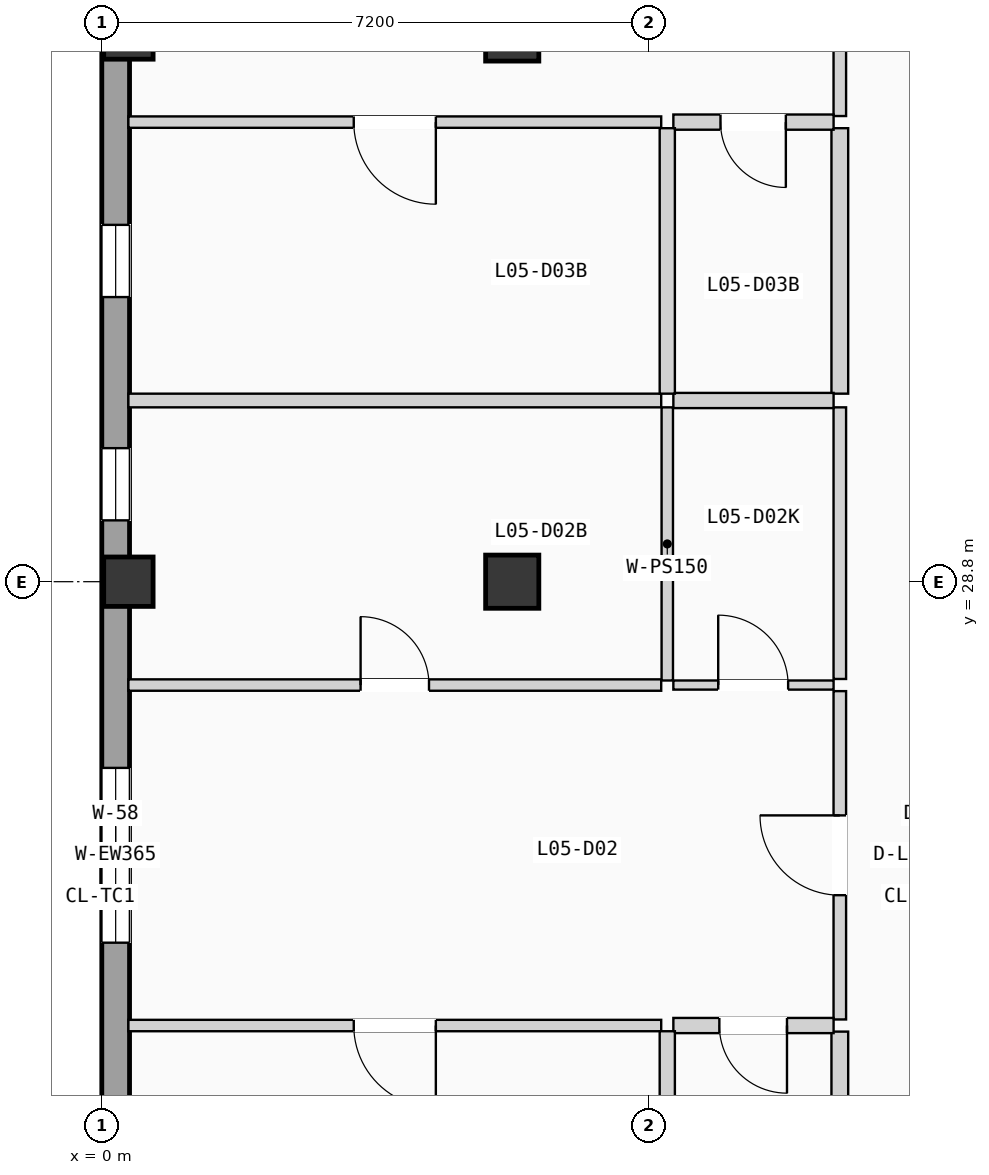
"""IFC4 building model, lengths in metres.
Left out: names, types, materials, properties, quantities, classifications, styles, units other than length and angle.
Written with IfcOpenShell. Run it as: python <this file> out.ifc"""

import sys

from ifc_helpers import new_model, si_unit, direction, frame, frame_2d, origin, origin_2d, place, context, subcontext, project, spatial, rectangle, extrude, element, fill, save


model = new_model("IFC4")
c1 = context("Model", 3, precision=1e-05, world=origin(), true_north=direction((0.0, 1.0)))
c2 = subcontext(c1, "Body", "Model", "MODEL_VIEW")
j1 = project(units=[si_unit("LENGTHUNIT", "METRE"), si_unit("PLANEANGLEUNIT", "RADIAN")], contexts=[c1])
p1 = place(None, origin())
s1 = spatial("IfcSite", under=j1, at=p1, CompositionType="ELEMENT")
p2 = place(p1, origin())
s2 = spatial("IfcBuilding", under=s1, at=p2, CompositionType="ELEMENT")
p3 = place(p2, frame((0.0, 0.0, 18.375)))
s3 = spatial("IfcBuildingStorey", under=s2, at=p3, CompositionType="ELEMENT", Elevation=18.375)
for number, where, z_axis, x_axis in (
    (1, (0.35, 28.8, 0.0), (0.0, 0.0, 1.0), (1.0, 0.0, 0.0)),
    (2, (0.35, 36.0, 0.0), (0.0, 0.0, 1.0), (1.0, 0.0, 0.0)),
):
    element("IfcColumn", number, at=place(p3, frame(where, z_axis=z_axis, x_axis=x_axis)), inside=s3, PredefinedType="COLUMN", context=c2, shape_type="SweptSolid", body=[
        extrude(rectangle(XDim=0.65, YDim=0.65, at=origin_2d()), origin(), (0.0, 0.0, 1.0), 3.15),
    ])
for number, where, z_axis, x_axis in (
    (3, (5.4, 28.8, 0.0), (0.0, 0.0, 1.0), (1.0, 0.0, 0.0)),
    (4, (5.4, 36.0, 0.0), (0.0, 0.0, 1.0), (1.0, 0.0, 0.0)),
):
    element("IfcColumn", number, at=place(p3, frame(where, z_axis=z_axis, x_axis=x_axis)), inside=s3, PredefinedType="COLUMN", context=c2, shape_type="SweptSolid", body=[
        extrude(rectangle(XDim=0.7, YDim=0.7, at=origin_2d()), origin(), (0.0, 0.0, 1.0), 3.15),
    ])
p4 = place(p3, frame((0.183, 0.365, 0.0), z_axis=(0.0, 0.0, 1.0), x_axis=(0.0, 1.0, 0.0)))
e5 = element("IfcWall", 5, at=p4, inside=s3, PredefinedType="SOLIDWALL", context=c2, shape_type="SweptSolid", body=[
    extrude(rectangle(XDim=49.67, YDim=0.365, at=frame_2d((24.835, 0.0))), origin(), (0.0, 0.0, 1.0), 2.89),
])
p5 = place(p4, frame((11.851, 0.0, 0.85)))
e6 = element("IfcOpeningElement", 6, at=p5, cuts=e5, PredefinedType="OPENING", context=c2, shape_type="SweptSolid", body=[
    extrude(rectangle(XDim=0.95, YDim=1.2, at=frame_2d((0.475, 0.6))), frame((0.0, 0.192, 0.0), z_axis=(0.0, -1.0, 0.0), x_axis=(1.0, 0.0, 0.0)), (0.0, 0.0, 1.0), 0.385),
])
p6 = place(p4, frame((7.831, 0.0, 0.9)))
e7 = element("IfcOpeningElement", 7, at=p6, cuts=e5, PredefinedType="OPENING", context=c2, shape_type="SweptSolid", body=[
    extrude(rectangle(XDim=2.3, YDim=1.2, at=frame_2d((1.15, 0.6))), frame((0.0, 0.192, 0.0), z_axis=(0.0, -1.0, 0.0), x_axis=(1.0, 0.0, 0.0)), (0.0, 0.0, 1.0), 0.385),
])
p7 = place(p4, frame((15.865, 0.0, 0.855)))
e8 = element("IfcOpeningElement", 8, at=p7, cuts=e5, PredefinedType="OPENING", context=c2, shape_type="SweptSolid", body=[
    extrude(rectangle(XDim=2.3, YDim=1.35, at=frame_2d((1.15, 0.675))), frame((0.0, 0.192, 0.0), z_axis=(0.0, -1.0, 0.0), x_axis=(1.0, 0.0, 0.0)), (0.0, 0.0, 1.0), 0.385),
])
p8 = place(p4, frame((23.685, 0.0, 0.705)))
e9 = element("IfcOpeningElement", 9, at=p8, cuts=e5, PredefinedType="OPENING", context=c2, shape_type="SweptSolid", body=[
    extrude(rectangle(XDim=2.3, YDim=1.5, at=frame_2d((1.15, 0.75))), frame((0.0, 0.192, 0.0), z_axis=(0.0, -1.0, 0.0), x_axis=(1.0, 0.0, 0.0)), (0.0, 0.0, 1.0), 0.385),
])
p9 = place(p4, frame((19.478, 0.0, 0.85)))
e10 = element("IfcOpeningElement", 10, at=p9, cuts=e5, PredefinedType="OPENING", context=c2, shape_type="SweptSolid", body=[
    extrude(rectangle(XDim=0.95, YDim=1.2, at=frame_2d((0.475, 0.6))), frame((0.0, 0.192, 0.0), z_axis=(0.0, -1.0, 0.0), x_axis=(1.0, 0.0, 0.0)), (0.0, 0.0, 1.0), 0.385),
])
p10 = place(p4, frame((29.242, 0.0, 0.85)))
e11 = element("IfcOpeningElement", 11, at=p10, cuts=e5, PredefinedType="OPENING", context=c2, shape_type="SweptSolid", body=[
    extrude(rectangle(XDim=0.95, YDim=1.2, at=frame_2d((0.475, 0.6))), frame((0.0, 0.192, 0.0), z_axis=(0.0, -1.0, 0.0), x_axis=(1.0, 0.0, 0.0)), (0.0, 0.0, 1.0), 0.385),
])
p11 = place(p4, frame((36.868, 0.0, 0.9)))
e12 = element("IfcOpeningElement", 12, at=p11, cuts=e5, PredefinedType="OPENING", context=c2, shape_type="SweptSolid", body=[
    extrude(rectangle(XDim=0.95, YDim=1.2, at=frame_2d((0.475, 0.6))), frame((0.0, 0.192, 0.0), z_axis=(0.0, -1.0, 0.0), x_axis=(1.0, 0.0, 0.0)), (0.0, 0.0, 1.0), 0.385),
])
p12 = place(p4, frame((32.18, 0.0, 0.855)))
e13 = element("IfcOpeningElement", 13, at=p12, cuts=e5, PredefinedType="OPENING", context=c2, shape_type="SweptSolid", body=[
    extrude(rectangle(XDim=0.95, YDim=1.35, at=frame_2d((0.475, 0.675))), frame((0.0, 0.192, 0.0), z_axis=(0.0, -1.0, 0.0), x_axis=(1.0, 0.0, 0.0)), (0.0, 0.0, 1.0), 0.385),
])
p13 = place(p4, frame((40.213, 0.0, 0.705)))
e14 = element("IfcOpeningElement", 14, at=p13, cuts=e5, PredefinedType="OPENING", context=c2, shape_type="SweptSolid", body=[
    extrude(rectangle(XDim=0.95, YDim=1.5, at=frame_2d((0.475, 0.75))), frame((0.0, 0.192, 0.0), z_axis=(0.0, -1.0, 0.0), x_axis=(1.0, 0.0, 0.0)), (0.0, 0.0, 1.0), 0.385),
])
p14 = place(p3, frame((9.71, 23.04, 0.0), z_axis=(0.0, 0.0, 1.0), x_axis=(0.0, 1.0, 0.0)))
e15 = element("IfcWall", 15, at=p14, inside=s3, PredefinedType="PARTITIONING", context=c2, shape_type="SweptSolid", body=[
    extrude(rectangle(XDim=4.32, YDim=0.165, at=frame_2d((2.16, 0.0))), origin(), (0.0, 0.0, 1.0), 2.87),
])
p15 = place(p14, frame((1.635, 0.0, 0.0)))
e16 = element("IfcOpeningElement", 16, at=p15, cuts=e15, PredefinedType="OPENING", context=c2, shape_type="SweptSolid", body=[
    extrude(rectangle(XDim=1.05, YDim=2.13, at=frame_2d((0.525, 1.065))), frame((0.0, 0.093, 0.0), z_axis=(0.0, -1.0, 0.0), x_axis=(1.0, 0.0, 0.0)), (0.0, 0.0, 1.0), 0.185),
])
p16 = place(p3, frame((9.71, 19.306, 0.0), z_axis=(0.0, 0.0, 1.0), x_axis=(0.0, 1.0, 0.0)))
e17 = element("IfcWall", 17, at=p16, inside=s3, PredefinedType="PLUMBINGWALL", context=c2, shape_type="SweptSolid", body=[
    extrude(rectangle(XDim=3.574, YDim=0.22, at=frame_2d((1.787, 0.0))), origin(), (0.0, 0.0, 1.0), 2.87),
])
p17 = place(p3, frame((9.71, 27.52, 0.0), z_axis=(0.0, 0.0, 1.0), x_axis=(0.0, 1.0, 0.0)))
e18 = element("IfcWall", 18, at=p17, inside=s3, PredefinedType="PARTITIONING", context=c2, shape_type="SweptSolid", body=[
    extrude(rectangle(XDim=3.574, YDim=0.165, at=frame_2d((1.787, 0.0))), origin(), (0.0, 0.0, 1.0), 2.87),
])
p18 = place(p3, frame((9.71, 34.927, 0.0), z_axis=(0.0, 0.0, 1.0), x_axis=(0.0, 1.0, 0.0)))
e19 = element("IfcWall", 19, at=p18, inside=s3, PredefinedType="PARTITIONING", context=c2, shape_type="SweptSolid", body=[
    extrude(rectangle(XDim=4.22, YDim=0.165, at=frame_2d((2.11, 0.0))), origin(), (0.0, 0.0, 1.0), 2.87),
])
p19 = place(p18, frame((1.585, 0.0, 0.0)))
e20 = element("IfcOpeningElement", 20, at=p19, cuts=e19, PredefinedType="OPENING", context=c2, shape_type="SweptSolid", body=[
    extrude(rectangle(XDim=1.05, YDim=2.13, at=frame_2d((0.525, 1.065))), frame((0.0, 0.093, 0.0), z_axis=(0.0, -1.0, 0.0), x_axis=(1.0, 0.0, 0.0)), (0.0, 0.0, 1.0), 0.185),
])
p20 = place(p3, frame((9.71, 31.274, 0.0), z_axis=(0.0, 0.0, 1.0), x_axis=(0.0, 1.0, 0.0)))
e21 = element("IfcWall", 21, at=p20, inside=s3, PredefinedType="PLUMBINGWALL", context=c2, shape_type="SweptSolid", body=[
    extrude(rectangle(XDim=3.493, YDim=0.22, at=frame_2d((1.747, 0.0))), origin(), (0.0, 0.0, 1.0), 2.87),
])
p21 = place(p3, frame((7.52, 22.96, 0.0), z_axis=(0.0, 0.0, 1.0), x_axis=(1.0, 0.0, 0.0)))
e22 = element("IfcWall", 22, at=p21, inside=s3, PredefinedType="PLUMBINGWALL", context=c2, shape_type="SweptSolid", body=[
    extrude(rectangle(XDim=2.108, YDim=0.2, at=frame_2d((1.054, 0.0))), origin(), (0.0, 0.0, 1.0), 2.87),
])
p22 = place(p21, frame((0.605, 0.0, 0.0)))
e23 = element("IfcOpeningElement", 23, at=p22, cuts=e22, PredefinedType="OPENING", context=c2, shape_type="SweptSolid", body=[
    extrude(rectangle(XDim=0.89, YDim=2.03, at=frame_2d((0.445, 1.015))), frame((0.0, 0.11, 0.0), z_axis=(0.0, -1.0, 0.0), x_axis=(1.0, 0.0, 0.0)), (0.0, 0.0, 1.0), 0.22),
])
p23 = place(p3, frame((7.52, 27.44, 0.0), z_axis=(0.0, 0.0, 1.0), x_axis=(1.0, 0.0, 0.0)))
e24 = element("IfcWall", 24, at=p23, inside=s3, PredefinedType="PARTITIONING", context=c2, shape_type="SweptSolid", body=[
    extrude(rectangle(XDim=2.108, YDim=0.12, at=frame_2d((1.054, 0.0))), origin(), (0.0, 0.0, 1.0), 2.87),
])
p24 = place(p23, frame((0.59, 0.0, 0.0)))
e25 = element("IfcOpeningElement", 25, at=p24, cuts=e24, PredefinedType="OPENING", context=c2, shape_type="SweptSolid", body=[
    extrude(rectangle(XDim=0.92, YDim=2.02, at=frame_2d((0.46, 1.01))), frame((0.0, 0.07, 0.0), z_axis=(0.0, -1.0, 0.0), x_axis=(1.0, 0.0, 0.0)), (0.0, 0.0, 1.0), 0.14),
])
p25 = place(p3, frame((0.35, 22.96, 0.0), z_axis=(0.0, 0.0, 1.0), x_axis=(1.0, 0.0, 0.0)))
e26 = element("IfcWall", 26, at=p25, inside=s3, PredefinedType="PARTITIONING", context=c2, shape_type="SweptSolid", body=[
    extrude(rectangle(XDim=7.01, YDim=0.15, at=frame_2d((3.505, 0.0))), origin(), (0.0, 0.0, 1.0), 2.87),
])
p26 = place(p25, frame((2.965, 0.0, 0.0)))
e27 = element("IfcOpeningElement", 27, at=p26, cuts=e26, PredefinedType="OPENING", context=c2, shape_type="SweptSolid", body=[
    extrude(rectangle(XDim=1.08, YDim=2.1, at=frame_2d((0.54, 1.05))), frame((0.0, 0.085, 0.0), z_axis=(0.0, -1.0, 0.0), x_axis=(1.0, 0.0, 0.0)), (0.0, 0.0, 1.0), 0.17),
])
p27 = place(p3, frame((0.35, 27.44, 0.0), z_axis=(0.0, 0.0, 1.0), x_axis=(1.0, 0.0, 0.0)))
e28 = element("IfcWall", 28, at=p27, inside=s3, PredefinedType="PARTITIONING", context=c2, shape_type="SweptSolid", body=[
    extrude(rectangle(XDim=7.01, YDim=0.15, at=frame_2d((3.505, 0.0))), origin(), (0.0, 0.0, 1.0), 2.87),
])
p28 = place(p27, frame((3.055, 0.0, 0.0)))
e29 = element("IfcOpeningElement", 29, at=p28, cuts=e28, PredefinedType="OPENING", context=c2, shape_type="SweptSolid", body=[
    extrude(rectangle(XDim=0.9, YDim=2.04, at=frame_2d((0.45, 1.02))), frame((0.0, 0.085, 0.0), z_axis=(0.0, -1.0, 0.0), x_axis=(1.0, 0.0, 0.0)), (0.0, 0.0, 1.0), 0.17),
])
p29 = place(p3, frame((7.44, 19.306, 0.0), z_axis=(0.0, 0.0, 1.0), x_axis=(0.0, 1.0, 0.0)))
e30 = element("IfcWall", 30, at=p29, inside=s3, PredefinedType="PLUMBINGWALL", context=c2, shape_type="SweptSolid", body=[
    extrude(rectangle(XDim=3.579, YDim=0.2, at=frame_2d((1.79, 0.0))), origin(), (0.0, 0.0, 1.0), 2.87),
])
p30 = place(p3, frame((7.44, 27.5, 0.0), z_axis=(0.0, 0.0, 1.0), x_axis=(0.0, 1.0, 0.0)))
e31 = element("IfcWall", 31, at=p30, inside=s3, PredefinedType="PARTITIONING", context=c2, shape_type="SweptSolid", body=[
    extrude(rectangle(XDim=3.594, YDim=0.15, at=frame_2d((1.797, 0.0))), origin(), (0.0, 0.0, 1.0), 2.87),
])
p31 = place(p3, frame((7.52, 31.184, 0.0), z_axis=(0.0, 0.0, 1.0), x_axis=(1.0, 0.0, 0.0)))
e32 = element("IfcWall", 32, at=p31, inside=s3, PredefinedType="PLUMBINGWALL", context=c2, shape_type="SweptSolid", body=[
    extrude(rectangle(XDim=2.108, YDim=0.2, at=frame_2d((1.054, 0.0))), origin(), (0.0, 0.0, 1.0), 2.87),
])
p32 = place(p3, frame((0.35, 31.184, 0.0), z_axis=(0.0, 0.0, 1.0), x_axis=(1.0, 0.0, 0.0)))
e33 = element("IfcWall", 33, at=p32, inside=s3, PredefinedType="PARTITIONING", context=c2, shape_type="SweptSolid", body=[
    extrude(rectangle(XDim=7.01, YDim=0.18, at=frame_2d((3.505, 0.0))), origin(), (0.0, 0.0, 1.0), 2.87),
])
p33 = place(p3, frame((7.52, 34.847, 0.0), z_axis=(0.0, 0.0, 1.0), x_axis=(1.0, 0.0, 0.0)))
e34 = element("IfcWall", 34, at=p33, inside=s3, PredefinedType="PLUMBINGWALL", context=c2, shape_type="SweptSolid", body=[
    extrude(rectangle(XDim=2.108, YDim=0.2, at=frame_2d((1.054, 0.0))), origin(), (0.0, 0.0, 1.0), 2.87),
])
p34 = place(p33, frame((0.62, 0.0, 0.0)))
e35 = element("IfcOpeningElement", 35, at=p34, cuts=e34, PredefinedType="OPENING", context=c2, shape_type="SweptSolid", body=[
    extrude(rectangle(XDim=0.86, YDim=2.0, at=frame_2d((0.43, 1.0))), frame((0.0, 0.11, 0.0), z_axis=(0.0, -1.0, 0.0), x_axis=(1.0, 0.0, 0.0)), (0.0, 0.0, 1.0), 0.22),
])
p35 = place(p3, frame((0.35, 34.847, 0.0), z_axis=(0.0, 0.0, 1.0), x_axis=(1.0, 0.0, 0.0)))
e36 = element("IfcWall", 36, at=p35, inside=s3, PredefinedType="PARTITIONING", context=c2, shape_type="SweptSolid", body=[
    extrude(rectangle(XDim=7.01, YDim=0.15, at=frame_2d((3.505, 0.0))), origin(), (0.0, 0.0, 1.0), 2.87),
])
p36 = place(p35, frame((2.965, 0.0, 0.0)))
e37 = element("IfcOpeningElement", 37, at=p36, cuts=e36, PredefinedType="OPENING", context=c2, shape_type="SweptSolid", body=[
    extrude(rectangle(XDim=1.08, YDim=2.1, at=frame_2d((0.54, 1.05))), frame((0.0, 0.085, 0.0), z_axis=(0.0, -1.0, 0.0), x_axis=(1.0, 0.0, 0.0)), (0.0, 0.0, 1.0), 0.17),
])
p37 = place(p3, frame((7.44, 31.274, 0.0), z_axis=(0.0, 0.0, 1.0), x_axis=(0.0, 1.0, 0.0)))
e38 = element("IfcWall", 38, at=p37, inside=s3, PredefinedType="PLUMBINGWALL", context=c2, shape_type="SweptSolid", body=[
    extrude(rectangle(XDim=3.493, YDim=0.2, at=frame_2d((1.747, 0.0))), origin(), (0.0, 0.0, 1.0), 2.87),
])
p38 = place(p8, origin())
e39 = element("IfcWindow", 39, at=p38, inside=s3, PartitioningType="DOUBLE_PANEL_VERTICAL", PredefinedType="WINDOW", context=c2, shape_type="SweptSolid", body=[
    extrude(rectangle(XDim=2.3, YDim=1.5, at=frame_2d((1.15, 0.75))), frame((0.0, 0.03, 0.0), z_axis=(0.0, -1.0, 0.0), x_axis=(1.0, 0.0, 0.0)), (0.0, 0.0, 1.0), 0.06),
])
fill(e9, e39)
p39 = place(p10, origin())
e40 = element("IfcWindow", 40, at=p39, inside=s3, PartitioningType="SINGLE_PANEL", PredefinedType="WINDOW", context=c2, shape_type="SweptSolid", body=[
    extrude(rectangle(XDim=0.95, YDim=1.2, at=frame_2d((0.475, 0.6))), frame((0.0, 0.03, 0.0), z_axis=(0.0, -1.0, 0.0), x_axis=(1.0, 0.0, 0.0)), (0.0, 0.0, 1.0), 0.06),
])
fill(e11, e40)
p40 = place(p12, origin())
e41 = element("IfcWindow", 41, at=p40, inside=s3, PartitioningType="SINGLE_PANEL", PredefinedType="WINDOW", context=c2, shape_type="SweptSolid", body=[
    extrude(rectangle(XDim=0.95, YDim=1.35, at=frame_2d((0.475, 0.675))), frame((0.0, 0.03, 0.0), z_axis=(0.0, -1.0, 0.0), x_axis=(1.0, 0.0, 0.0)), (0.0, 0.0, 1.0), 0.06),
])
fill(e13, e41)
p41 = place(p15, origin())
e42 = element("IfcDoor", 42, at=p41, inside=s3, OperationType="SINGLE_SWING_RIGHT", PredefinedType="DOOR", context=c2, shape_type="SweptSolid", body=[
    extrude(rectangle(XDim=1.05, YDim=2.13, at=frame_2d((0.525, 1.065))), frame((0.0, 0.025, 0.0), z_axis=(0.0, -1.0, 0.0), x_axis=(1.0, 0.0, 0.0)), (0.0, 0.0, 1.0), 0.05),
])
fill(e16, e42)
p42 = place(p22, frame((0.89, 0.0, 0.0), z_axis=(0.0, 0.0, 1.0), x_axis=(-1.0, 0.0, 0.0)))
e43 = element("IfcDoor", 43, at=p42, inside=s3, OperationType="SINGLE_SWING_RIGHT", PredefinedType="DOOR", context=c2, shape_type="SweptSolid", body=[
    extrude(rectangle(XDim=0.89, YDim=2.03, at=frame_2d((0.445, 1.015))), frame((0.0, 0.025, 0.0), z_axis=(0.0, -1.0, 0.0), x_axis=(1.0, 0.0, 0.0)), (0.0, 0.0, 1.0), 0.05),
])
fill(e23, e43)
p43 = place(p24, origin())
e44 = element("IfcDoor", 44, at=p43, inside=s3, OperationType="SINGLE_SWING_LEFT", PredefinedType="DOOR", context=c2, shape_type="SweptSolid", body=[
    extrude(rectangle(XDim=0.92, YDim=2.02, at=frame_2d((0.46, 1.01))), frame((0.0, 0.025, 0.0), z_axis=(0.0, -1.0, 0.0), x_axis=(1.0, 0.0, 0.0)), (0.0, 0.0, 1.0), 0.05),
])
fill(e25, e44)
p44 = place(p26, frame((1.08, 0.0, 0.0), z_axis=(0.0, 0.0, 1.0), x_axis=(-1.0, 0.0, 0.0)))
e45 = element("IfcDoor", 45, at=p44, inside=s3, OperationType="SINGLE_SWING_RIGHT", PredefinedType="DOOR", context=c2, shape_type="SweptSolid", body=[
    extrude(rectangle(XDim=1.08, YDim=2.1, at=frame_2d((0.54, 1.05))), frame((0.0, 0.025, 0.0), z_axis=(0.0, -1.0, 0.0), x_axis=(1.0, 0.0, 0.0)), (0.0, 0.0, 1.0), 0.05),
])
fill(e27, e45)
p45 = place(p28, origin())
e46 = element("IfcDoor", 46, at=p45, inside=s3, OperationType="SINGLE_SWING_LEFT", PredefinedType="DOOR", context=c2, shape_type="SweptSolid", body=[
    extrude(rectangle(XDim=0.9, YDim=2.04, at=frame_2d((0.45, 1.02))), frame((0.0, 0.025, 0.0), z_axis=(0.0, -1.0, 0.0), x_axis=(1.0, 0.0, 0.0)), (0.0, 0.0, 1.0), 0.05),
])
fill(e29, e46)
p46 = place(p34, frame((0.86, 0.0, 0.0), z_axis=(0.0, 0.0, 1.0), x_axis=(-1.0, 0.0, 0.0)))
e47 = element("IfcDoor", 47, at=p46, inside=s3, OperationType="SINGLE_SWING_RIGHT", PredefinedType="DOOR", context=c2, shape_type="SweptSolid", body=[
    extrude(rectangle(XDim=0.86, YDim=2.0, at=frame_2d((0.43, 1.0))), frame((0.0, 0.025, 0.0), z_axis=(0.0, -1.0, 0.0), x_axis=(1.0, 0.0, 0.0)), (0.0, 0.0, 1.0), 0.05),
])
fill(e35, e47)
p47 = place(p36, frame((1.08, 0.0, 0.0), z_axis=(0.0, 0.0, 1.0), x_axis=(-1.0, 0.0, 0.0)))
e48 = element("IfcDoor", 48, at=p47, inside=s3, OperationType="SINGLE_SWING_RIGHT", PredefinedType="DOOR", context=c2, shape_type="SweptSolid", body=[
    extrude(rectangle(XDim=1.08, YDim=2.1, at=frame_2d((0.54, 1.05))), frame((0.0, 0.025, 0.0), z_axis=(0.0, -1.0, 0.0), x_axis=(1.0, 0.0, 0.0)), (0.0, 0.0, 1.0), 0.05),
])
fill(e37, e48)
save(model, sys.argv[1])
